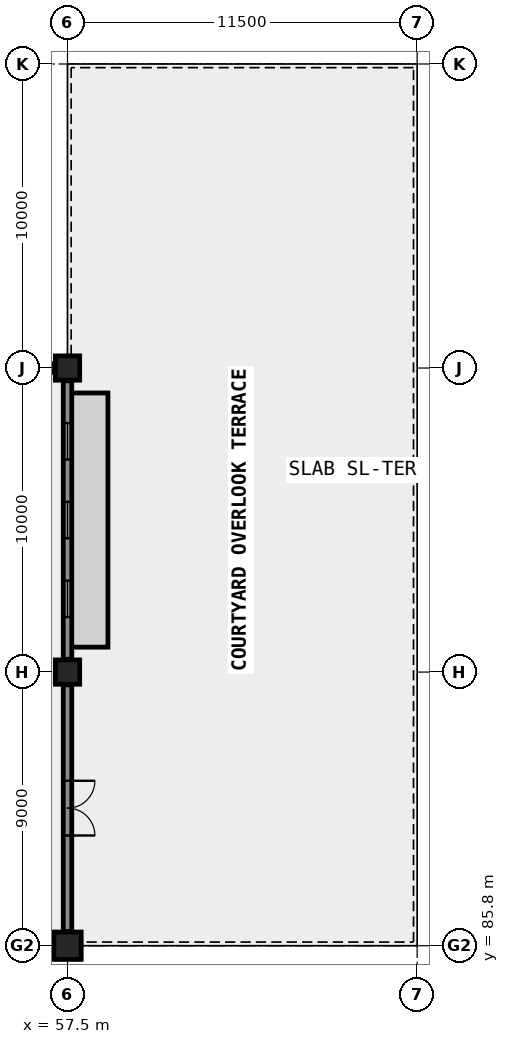
"""IFC4 building model, lengths in metres.
Left out: names, types, materials, properties, quantities, classifications, styles, units other than length and angle.
Written with IfcOpenShell. Run it as: python <this file> out.ifc"""

import sys

from ifc_helpers import new_model, si_unit, direction, frame, frame_2d, origin, origin_2d, place, context, subcontext, project, spatial, rectangle, extrude, element, fill, save


model = new_model("IFC4")
c1 = context("Model", 3, precision=1e-05, world=origin(), true_north=direction((0.0, 1.0)))
c2 = subcontext(c1, "Body", "Model", "MODEL_VIEW")
j1 = project(units=[si_unit("LENGTHUNIT", "METRE"), si_unit("PLANEANGLEUNIT", "RADIAN")], contexts=[c1])
p1 = place(None, origin())
s1 = spatial("IfcSite", under=j1, at=p1, CompositionType="ELEMENT")
p2 = place(p1, origin())
s2 = spatial("IfcBuilding", under=s1, at=p2, CompositionType="ELEMENT")
p3 = place(p2, frame((0.0, 0.0, 18.3)))
s3 = spatial("IfcBuildingStorey", under=s2, at=p3, CompositionType="ELEMENT", Elevation=18.3)
p4 = place(p3, frame((57.5, 85.8, 0.0), z_axis=(0.0, 0.0, 1.0), x_axis=(1.0, 0.0, 0.0)))
e1 = element("IfcColumn", 1, at=p4, inside=s3, PredefinedType="COLUMN", context=c2, shape_type="SweptSolid", body=[
    extrude(rectangle(XDim=0.9, YDim=0.9, at=origin_2d()), origin(), (0.0, 0.0, 1.0), 4.16),
])
for number, where, z_axis, x_axis in (
    (2, (57.5, 94.8, 0.0), (0.0, 0.0, 1.0), (1.0, 0.0, 0.0)),
    (3, (57.5, 104.8, 0.0), (0.0, 0.0, 1.0), (1.0, 0.0, 0.0)),
):
    element("IfcColumn", number, at=place(p3, frame(where, z_axis=z_axis, x_axis=x_axis)), inside=s3, PredefinedType="COLUMN", context=c2, shape_type="SweptSolid", body=[
        extrude(rectangle(XDim=0.8, YDim=0.8, at=origin_2d()), origin(), (0.0, 0.0, 1.0), 4.16),
    ])
p5 = place(p3, frame((46.47, 85.8, 0.0), z_axis=(0.0, 0.0, 1.0), x_axis=(1.0, 0.0, 0.0)))
e4 = element("IfcWall", 4, at=p5, inside=s3, PredefinedType="SOLIDWALL", context=c2, shape_type="SweptSolid", body=[
    extrude(rectangle(XDim=10.56, YDim=0.28, at=frame_2d((5.28, 0.0))), origin(), (0.0, 0.0, 1.0), 3.1),
])
p6 = place(p5, frame((1.74, 0.0, 0.8)))
e5 = element("IfcOpeningElement", 5, at=p6, cuts=e4, PredefinedType="OPENING", context=c2, shape_type="SweptSolid", body=[
    extrude(rectangle(XDim=1.2, YDim=2.1, at=frame_2d((0.6, 1.05))), frame((0.0, 0.15, 0.0), z_axis=(0.0, -1.0, 0.0), x_axis=(1.0, 0.0, 0.0)), (0.0, 0.0, 1.0), 0.3),
])
p7 = place(p5, frame((4.68, 0.0, 0.8)))
e6 = element("IfcOpeningElement", 6, at=p7, cuts=e4, PredefinedType="OPENING", context=c2, shape_type="SweptSolid", body=[
    extrude(rectangle(XDim=1.2, YDim=2.1, at=frame_2d((0.6, 1.05))), frame((0.0, 0.15, 0.0), z_axis=(0.0, -1.0, 0.0), x_axis=(1.0, 0.0, 0.0)), (0.0, 0.0, 1.0), 0.3),
])
p8 = place(p5, frame((7.62, 0.0, 0.8)))
e7 = element("IfcOpeningElement", 7, at=p8, cuts=e4, PredefinedType="OPENING", context=c2, shape_type="SweptSolid", body=[
    extrude(rectangle(XDim=1.2, YDim=2.1, at=frame_2d((0.6, 1.05))), frame((0.0, 0.15, 0.0), z_axis=(0.0, -1.0, 0.0), x_axis=(1.0, 0.0, 0.0)), (0.0, 0.0, 1.0), 0.3),
])
p9 = place(p3, frame((57.5, 86.27, 0.0), z_axis=(0.0, 0.0, 1.0), x_axis=(0.0, 1.0, 0.0)))
e8 = element("IfcWall", 8, at=p9, inside=s3, PredefinedType="SOLIDWALL", context=c2, shape_type="SweptSolid", body=[
    extrude(rectangle(XDim=8.11, YDim=0.28, at=frame_2d((4.055, 0.0))), origin(), (0.0, 0.0, 1.0), 3.1),
])
p10 = place(p9, frame((3.155, 0.0, 0.0)))
e9 = element("IfcOpeningElement", 9, at=p10, cuts=e8, PredefinedType="OPENING", context=c2, shape_type="SweptSolid", body=[
    extrude(rectangle(XDim=1.8, YDim=2.25, at=frame_2d((0.9, 1.125))), frame((0.0, 0.15, 0.0), z_axis=(0.0, -1.0, 0.0), x_axis=(1.0, 0.0, 0.0)), (0.0, 0.0, 1.0), 0.3),
])
p11 = place(p3, frame((57.5, 95.22, 0.0), z_axis=(0.0, 0.0, 1.0), x_axis=(0.0, 1.0, 0.0)))
e10 = element("IfcWall", 10, at=p11, inside=s3, PredefinedType="SOLIDWALL", context=c2, shape_type="SweptSolid", body=[
    extrude(rectangle(XDim=9.16, YDim=0.28, at=frame_2d((4.58, 0.0))), origin(), (0.0, 0.0, 1.0), 3.1),
])
p12 = place(p11, frame((1.39, 0.0, 0.8)))
e11 = element("IfcOpeningElement", 11, at=p12, cuts=e10, PredefinedType="OPENING", context=c2, shape_type="SweptSolid", body=[
    extrude(rectangle(XDim=1.2, YDim=2.1, at=frame_2d((0.6, 1.05))), frame((0.0, 0.15, 0.0), z_axis=(0.0, -1.0, 0.0), x_axis=(1.0, 0.0, 0.0)), (0.0, 0.0, 1.0), 0.3),
])
p13 = place(p11, frame((3.98, 0.0, 0.8)))
e12 = element("IfcOpeningElement", 12, at=p13, cuts=e10, PredefinedType="OPENING", context=c2, shape_type="SweptSolid", body=[
    extrude(rectangle(XDim=1.2, YDim=2.1, at=frame_2d((0.6, 1.05))), frame((0.0, 0.15, 0.0), z_axis=(0.0, -1.0, 0.0), x_axis=(1.0, 0.0, 0.0)), (0.0, 0.0, 1.0), 0.3),
])
p14 = place(p11, frame((6.57, 0.0, 0.8)))
e13 = element("IfcOpeningElement", 13, at=p14, cuts=e10, PredefinedType="OPENING", context=c2, shape_type="SweptSolid", body=[
    extrude(rectangle(XDim=1.2, YDim=2.1, at=frame_2d((0.6, 1.05))), frame((0.0, 0.15, 0.0), z_axis=(0.0, -1.0, 0.0), x_axis=(1.0, 0.0, 0.0)), (0.0, 0.0, 1.0), 0.3),
])
p15 = place(p3, frame((46.42, 104.8, 0.0), z_axis=(0.0, 0.0, 1.0), x_axis=(1.0, 0.0, 0.0)))
e14 = element("IfcWall", 14, at=p15, inside=s3, PredefinedType="SOLIDWALL", context=c2, shape_type="SweptSolid", body=[
    extrude(rectangle(XDim=10.66, YDim=0.28, at=frame_2d((5.33, 0.0))), origin(), (0.0, 0.0, 1.0), 3.1),
])
p16 = place(p15, frame((1.765, 0.0, 0.8)))
e15 = element("IfcOpeningElement", 15, at=p16, cuts=e14, PredefinedType="OPENING", context=c2, shape_type="SweptSolid", body=[
    extrude(rectangle(XDim=1.2, YDim=2.1, at=frame_2d((0.6, 1.05))), frame((0.0, 0.15, 0.0), z_axis=(0.0, -1.0, 0.0), x_axis=(1.0, 0.0, 0.0)), (0.0, 0.0, 1.0), 0.3),
])
p17 = place(p15, frame((4.73, 0.0, 0.8)))
e16 = element("IfcOpeningElement", 16, at=p17, cuts=e14, PredefinedType="OPENING", context=c2, shape_type="SweptSolid", body=[
    extrude(rectangle(XDim=1.2, YDim=2.1, at=frame_2d((0.6, 1.05))), frame((0.0, 0.15, 0.0), z_axis=(0.0, -1.0, 0.0), x_axis=(1.0, 0.0, 0.0)), (0.0, 0.0, 1.0), 0.3),
])
p18 = place(p15, frame((7.695, 0.0, 0.8)))
e17 = element("IfcOpeningElement", 17, at=p18, cuts=e14, PredefinedType="OPENING", context=c2, shape_type="SweptSolid", body=[
    extrude(rectangle(XDim=1.2, YDim=2.1, at=frame_2d((0.6, 1.05))), frame((0.0, 0.15, 0.0), z_axis=(0.0, -1.0, 0.0), x_axis=(1.0, 0.0, 0.0)), (0.0, 0.0, 1.0), 0.3),
])
p19 = place(p10, frame((0.9, 0.0, 0.0), z_axis=(0.0, 0.0, 1.0), x_axis=(-1.0, 0.0, 0.0)))
e18 = element("IfcDoor", 18, at=p19, inside=s3, OperationType="DOUBLE_DOOR_SINGLE_SWING", PredefinedType="DOOR", context=c2, shape_type="SweptSolid", body=[
    extrude(rectangle(XDim=1.8, YDim=2.25, at=frame_2d((0.0, 1.125))), frame((0.0, 0.025, 0.0), z_axis=(0.0, -1.0, 0.0), x_axis=(1.0, 0.0, 0.0)), (0.0, 0.0, 1.0), 0.05),
])
fill(e9, e18)
p20 = place(p12, origin())
e19 = element("IfcWindow", 19, at=p20, inside=s3, PartitioningType="SINGLE_PANEL", PredefinedType="WINDOW", context=c2, shape_type="SweptSolid", body=[
    extrude(rectangle(XDim=1.2, YDim=2.1, at=frame_2d((0.6, 1.05))), frame((0.0, 0.03, 0.0), z_axis=(0.0, -1.0, 0.0), x_axis=(1.0, 0.0, 0.0)), (0.0, 0.0, 1.0), 0.06),
])
fill(e11, e19)
p21 = place(p13, origin())
e20 = element("IfcWindow", 20, at=p21, inside=s3, PartitioningType="SINGLE_PANEL", PredefinedType="WINDOW", context=c2, shape_type="SweptSolid", body=[
    extrude(rectangle(XDim=1.2, YDim=2.1, at=frame_2d((0.6, 1.05))), frame((0.0, 0.03, 0.0), z_axis=(0.0, -1.0, 0.0), x_axis=(1.0, 0.0, 0.0)), (0.0, 0.0, 1.0), 0.06),
])
fill(e12, e20)
p22 = place(p14, origin())
e21 = element("IfcWindow", 21, at=p22, inside=s3, PartitioningType="SINGLE_PANEL", PredefinedType="WINDOW", context=c2, shape_type="SweptSolid", body=[
    extrude(rectangle(XDim=1.2, YDim=2.1, at=frame_2d((0.6, 1.05))), frame((0.0, 0.03, 0.0), z_axis=(0.0, -1.0, 0.0), x_axis=(1.0, 0.0, 0.0)), (0.0, 0.0, 1.0), 0.06),
])
fill(e13, e21)
save(model, sys.argv[1])
